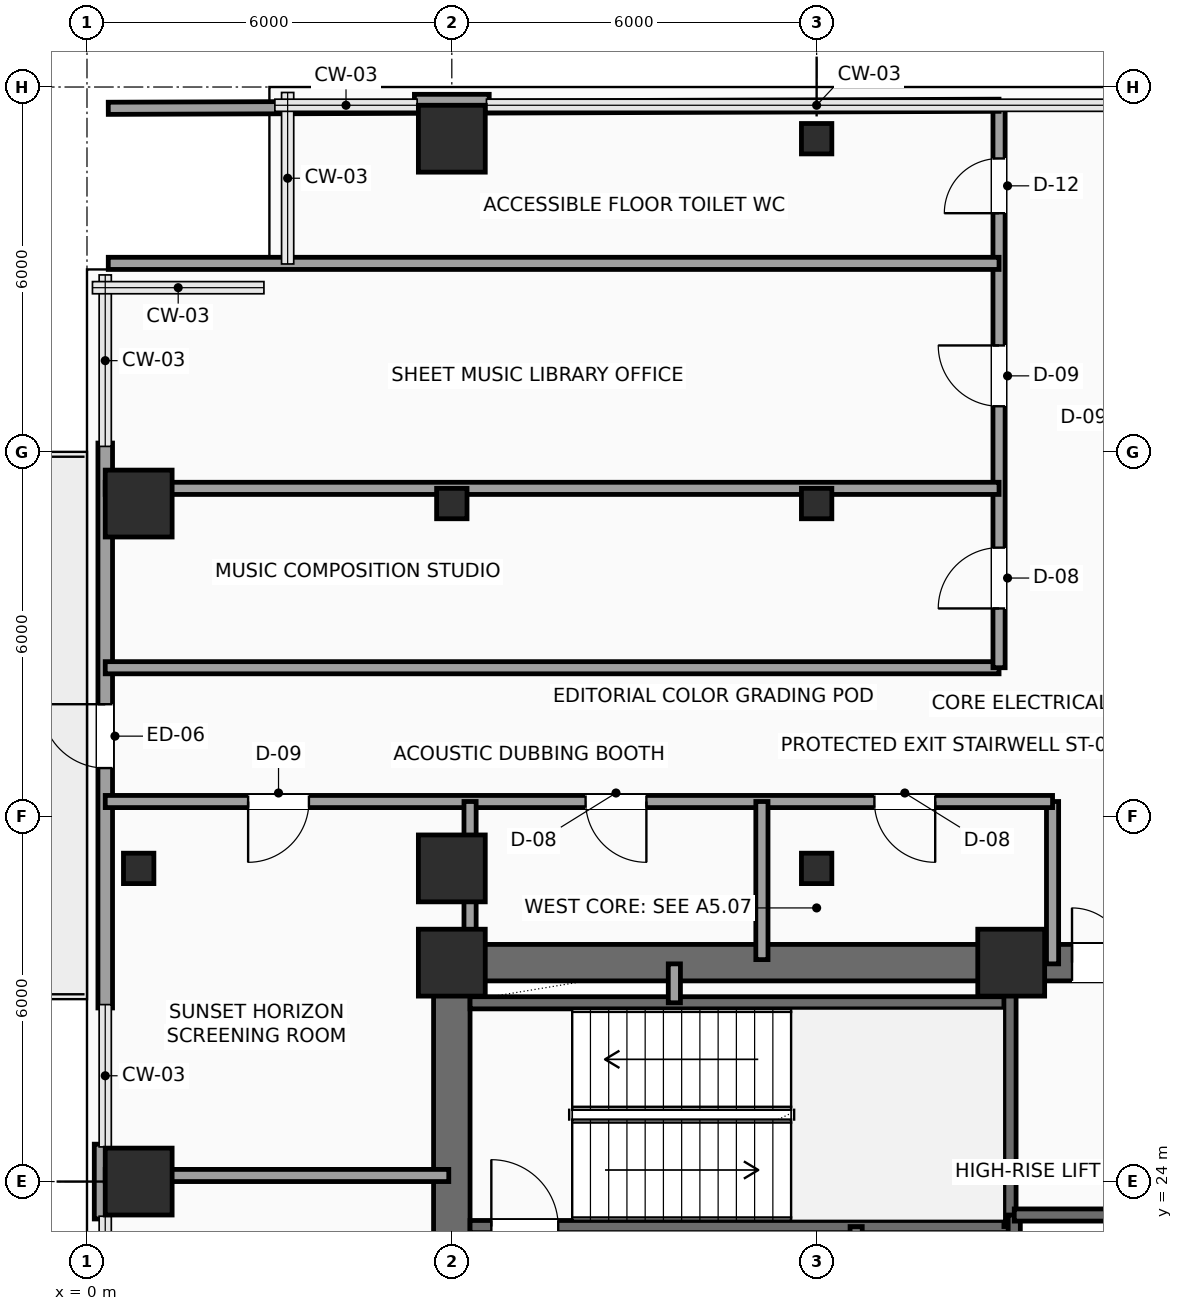
"""IFC4 building model, lengths in metres.
Left out: names, types, materials, properties, quantities, classifications, styles, units other than length and angle.
Written with IfcOpenShell. Run it as: python <this file> out.ifc"""

import sys

from ifc_helpers import new_model, si_unit, direction, frame, frame_2d, origin, origin_2d, place, context, subcontext, project, spatial, rectangle, hollow_rectangle, extrude, element, fill, save


model = new_model("IFC4")
c1 = context("Model", 3, precision=1e-05, world=origin(), true_north=direction((0.0, 1.0)))
c2 = subcontext(c1, "Body", "Model", "MODEL_VIEW")
j1 = project(units=[si_unit("LENGTHUNIT", "METRE"), si_unit("PLANEANGLEUNIT", "RADIAN")], contexts=[c1])
p1 = place(None, origin())
s1 = spatial("IfcSite", under=j1, at=p1, CompositionType="ELEMENT")
p2 = place(p1, origin())
s2 = spatial("IfcBuilding", under=s1, at=p2, CompositionType="ELEMENT")
p3 = place(p2, frame((0.0, 0.0, 123.15)))
s3 = spatial("IfcBuildingStorey", under=s2, at=p3, CompositionType="ELEMENT", Elevation=123.15)
for number, where, z_axis, x_axis in (
    (1, (6.0, 27.6, 0.0), (0.0, 0.0, 1.0), (1.0, 0.0, 0.0)),
    (2, (15.2, 27.6, 0.0), (0.0, 0.0, 1.0), (1.0, 0.0, 0.0)),
    (3, (0.85, 24.0, 0.0), (0.0, 0.0, 1.0), (1.0, 0.0, 0.0)),
):
    element("IfcColumn", number, at=place(p3, frame(where, z_axis=z_axis, x_axis=x_axis)), inside=s3, PredefinedType="COLUMN", context=c2, shape_type="SweptSolid", body=[
        extrude(rectangle(XDim=1.1, YDim=1.1, at=origin_2d()), origin(), (0.0, 0.0, 1.0), 3.75),
    ])
p4 = place(p3, frame((0.85, 29.15, 0.0), z_axis=(0.0, 0.0, 1.0), x_axis=(1.0, 0.0, 0.0)))
e4 = element("IfcColumn", 4, at=p4, inside=s3, PredefinedType="COLUMN", context=c2, shape_type="SweptSolid", body=[
    extrude(hollow_rectangle(XDim=0.5, YDim=0.5, WallThickness=0.025, InnerFilletRadius=0.025, OuterFilletRadius=0.04, at=origin_2d()), origin(), (0.0, 0.0, 1.0), 3.75),
])
for number, where, z_axis, x_axis in (
    (5, (0.85, 35.15, 0.0), (0.0, 0.0, 1.0), (1.0, 0.0, 0.0)),
    (6, (6.0, 29.15, 0.0), (0.0, 0.0, 1.0), (1.0, 0.0, 0.0)),
):
    element("IfcColumn", number, at=place(p3, frame(where, z_axis=z_axis, x_axis=x_axis)), inside=s3, PredefinedType="COLUMN", context=c2, shape_type="SweptSolid", body=[
        extrude(rectangle(XDim=1.1, YDim=1.1, at=origin_2d()), origin(), (0.0, 0.0, 1.0), 3.75),
    ])
p5 = place(p3, frame((6.0, 35.15, 0.0), z_axis=(0.0, 0.0, 1.0), x_axis=(1.0, 0.0, 0.0)))
e7 = element("IfcColumn", 7, at=p5, inside=s3, PredefinedType="COLUMN", context=c2, shape_type="SweptSolid", body=[
    extrude(hollow_rectangle(XDim=0.5, YDim=0.5, WallThickness=0.025, InnerFilletRadius=0.025, OuterFilletRadius=0.04, at=origin_2d()), origin(), (0.0, 0.0, 1.0), 3.75),
])
p6 = place(p3, frame((6.0, 41.15, 0.0), z_axis=(0.0, 0.0, 1.0), x_axis=(1.0, 0.0, 0.0)))
e8 = element("IfcColumn", 8, at=p6, inside=s3, PredefinedType="COLUMN", context=c2, shape_type="SweptSolid", body=[
    extrude(rectangle(XDim=1.1, YDim=1.1, at=origin_2d()), origin(), (0.0, 0.0, 1.0), 3.75),
])
for number, where, z_axis, x_axis in (
    (9, (12.0, 29.15, 0.0), (0.0, 0.0, 1.0), (1.0, 0.0, 0.0)),
    (10, (12.0, 35.15, 0.0), (0.0, 0.0, 1.0), (1.0, 0.0, 0.0)),
    (11, (12.0, 41.15, 0.0), (0.0, 0.0, 1.0), (1.0, 0.0, 0.0)),
):
    element("IfcColumn", number, at=place(p3, frame(where, z_axis=z_axis, x_axis=x_axis)), inside=s3, PredefinedType="COLUMN", context=c2, shape_type="SweptSolid", body=[
        extrude(hollow_rectangle(XDim=0.5, YDim=0.5, WallThickness=0.025, InnerFilletRadius=0.025, OuterFilletRadius=0.04, at=origin_2d()), origin(), (0.0, 0.0, 1.0), 3.75),
    ])
p7 = place(p3, frame((0.3, 26.855, 0.0), z_axis=(0.0, 0.0, 1.0), x_axis=(0.0, 1.0, 0.0)))
e12 = element("IfcWall", 12, at=p7, inside=s3, PredefinedType="SOLIDWALL", context=c2, shape_type="SweptSolid", body=[
    extrude(rectangle(XDim=9.29, YDim=0.24, at=frame_2d((4.645, 0.0))), origin(), (0.0, 0.0, 1.0), 3.525),
])
p8 = place(p7, frame((3.945, 0.0, 0.0)))
e13 = element("IfcOpeningElement", 13, at=p8, cuts=e12, PredefinedType="OPENING", context=c2, shape_type="SweptSolid", body=[
    extrude(rectangle(XDim=1.05, YDim=2.2, at=frame_2d((0.525, 1.1))), frame((0.0, 0.13, 0.0), z_axis=(0.0, -1.0, 0.0), x_axis=(1.0, 0.0, 0.0)), (0.0, 0.0, 1.0), 0.26),
])
for number, where, z_axis, x_axis in (
    (14, (0.24, 23.385, 0.0), (0.0, 0.0, 1.0), (0.0, 1.0, 0.0)),
    (15, (5.385, 41.76, 0.0), (0.0, 0.0, 1.0), (1.0, 0.0, 0.0)),
):
    element("IfcWall", number, at=place(p3, frame(where, z_axis=z_axis, x_axis=x_axis)), inside=s3, PredefinedType="SOLIDWALL", context=c2, shape_type="SweptSolid", body=[
        extrude(rectangle(XDim=1.23, YDim=0.24, at=frame_2d((0.615, 0.0))), origin(), (0.0, 0.0, 1.0), 3.525),
    ])
p9 = place(p3, frame((6.0, 27.6, 0.0), z_axis=(0.0, 0.0, 1.0), x_axis=(1.0, 0.0, 0.0)))
e16 = element("IfcWall", 16, at=p9, inside=s3, PredefinedType="SHEAR", context=c2, shape_type="SweptSolid", body=[
    extrude(rectangle(XDim=12.0, YDim=0.6, at=frame_2d((6.0, 0.0))), origin(), (0.0, 0.0, 1.0), 3.525),
])
p10 = place(p9, frame((10.2, 0.0, 0.0)))
e17 = element("IfcOpeningElement", 17, at=p10, cuts=e16, PredefinedType="OPENING", context=c2, shape_type="SweptSolid", body=[
    extrude(rectangle(XDim=0.9, YDim=2.15, at=frame_2d((0.45, 1.075))), frame((0.0, 0.31, 0.0), z_axis=(0.0, -1.0, 0.0), x_axis=(1.0, 0.0, 0.0)), (0.0, 0.0, 1.0), 0.62),
])
p11 = place(p3, frame((6.0, 18.0, 0.0), z_axis=(0.0, 0.0, 1.0), x_axis=(0.0, 1.0, 0.0)))
e18 = element("IfcWall", 18, at=p11, inside=s3, PredefinedType="SHEAR", context=c2, shape_type="SweptSolid", body=[
    extrude(rectangle(XDim=9.6, YDim=0.6, at=frame_2d((4.8, 0.0))), origin(), (0.0, 0.0, 1.0), 3.525),
])
p12 = place(p3, frame((6.3, 23.26, 0.0), z_axis=(0.0, 0.0, 1.0), x_axis=(1.0, 0.0, 0.0)))
e19 = element("IfcWall", 19, at=p12, inside=s3, PredefinedType="SHEAR", context=c2, shape_type="SweptSolid", body=[
    extrude(rectangle(XDim=8.88, YDim=0.2, at=frame_2d((4.44, 0.0))), origin(), (0.0, 0.0, 1.0), 3.525),
])
p13 = place(p12, frame((0.35, 0.0, 0.0)))
e20 = element("IfcOpeningElement", 20, at=p13, cuts=e19, PredefinedType="OPENING", context=c2, shape_type="SweptSolid", body=[
    extrude(rectangle(XDim=1.1, YDim=2.2, at=frame_2d((0.55, 1.1))), frame((0.0, 0.11, 0.0), z_axis=(0.0, -1.0, 0.0), x_axis=(1.0, 0.0, 0.0)), (0.0, 0.0, 1.0), 0.22),
])
p14 = place(p3, frame((6.3, 26.94, 0.0), z_axis=(0.0, 0.0, 1.0), x_axis=(1.0, 0.0, 0.0)))
e21 = element("IfcWall", 21, at=p14, inside=s3, PredefinedType="SHEAR", context=c2, shape_type="SweptSolid", body=[
    extrude(rectangle(XDim=8.88, YDim=0.2, at=frame_2d((4.44, 0.0))), origin(), (0.0, 0.0, 1.0), 3.525),
])
p15 = place(p3, frame((15.18, 23.26, 0.0), z_axis=(0.0, 0.0, 1.0), x_axis=(0.0, 1.0, 0.0)))
e22 = element("IfcWall", 22, at=p15, inside=s3, PredefinedType="SHEAR", context=c2, shape_type="SweptSolid", body=[
    extrude(rectangle(XDim=4.04, YDim=0.2, at=frame_2d((2.02, 0.0))), origin(), (0.0, 0.0, 1.0), 3.525),
])
p16 = place(p3, frame((12.65, 20.42, 0.0), z_axis=(0.0, 0.0, 1.0), x_axis=(0.0, 1.0, 0.0)))
e23 = element("IfcWall", 23, at=p16, inside=s3, PredefinedType="SHEAR", context=c2, shape_type="SweptSolid", body=[
    extrude(rectangle(XDim=2.84, YDim=0.2, at=frame_2d((1.42, 0.0))), origin(), (0.0, 0.0, 1.0), 3.525),
])
p17 = place(p16, frame((0.9, 0.0, 0.0)))
e24 = element("IfcOpeningElement", 24, at=p17, cuts=e23, PredefinedType="OPENING", context=c2, shape_type="SweptSolid", body=[
    extrude(rectangle(XDim=0.9, YDim=2.15, at=frame_2d((0.45, 1.075))), frame((0.0, 0.11, 0.0), z_axis=(0.0, -1.0, 0.0), x_axis=(1.0, 0.0, 0.0)), (0.0, 0.0, 1.0), 0.22),
])
p18 = place(p3, frame((9.66, 26.94, 0.0), z_axis=(0.0, 0.0, 1.0), x_axis=(0.0, 1.0, 0.0)))
e25 = element("IfcWall", 25, at=p18, inside=s3, PredefinedType="SOLIDWALL", context=c2, shape_type="SweptSolid", body=[
    extrude(rectangle(XDim=0.64, YDim=0.2, at=frame_2d((0.32, 0.0))), origin(), (0.0, 0.0, 1.0), 3.525),
])
p19 = place(p3, frame((15.25, 18.25, 0.0), z_axis=(0.0, 0.0, 1.0), x_axis=(0.0, 1.0, 0.0)))
e26 = element("IfcWall", 26, at=p19, inside=s3, PredefinedType="SHEAR", context=c2, shape_type="SweptSolid", body=[
    extrude(rectangle(XDim=5.2, YDim=0.2, at=frame_2d((2.6, 0.0))), origin(), (0.0, 0.0, 1.0), 3.525),
])
p20 = place(p3, frame((15.25, 23.45, 0.0), z_axis=(0.0, 0.0, 1.0), x_axis=(1.0, 0.0, 0.0)))
e27 = element("IfcWall", 27, at=p20, inside=s3, PredefinedType="SHEAR", context=c2, shape_type="SweptSolid", body=[
    extrude(rectangle(XDim=2.45, YDim=0.2, at=frame_2d((1.225, 0.0))), origin(), (0.0, 0.0, 1.0), 3.525),
])
p21 = place(p3, frame((15.88, 27.58, 0.0), z_axis=(0.0, 0.0, 1.0), x_axis=(0.0, 1.0, 0.0)))
e28 = element("IfcWall", 28, at=p21, inside=s3, PredefinedType="SOLIDWALL", context=c2, shape_type="SweptSolid", body=[
    extrude(rectangle(XDim=2.67, YDim=0.2, at=frame_2d((1.335, 0.0))), origin(), (0.0, 0.0, 1.0), 3.525),
])
p22 = place(p3, frame((15.88, 30.25, 0.0), z_axis=(0.0, 0.0, 1.0), x_axis=(-1.0, 0.0, 0.0)))
e29 = element("IfcWall", 29, at=p22, inside=s3, PredefinedType="SOLIDWALL", context=c2, shape_type="SweptSolid", body=[
    extrude(rectangle(XDim=15.58, YDim=0.2, at=frame_2d((7.79, 0.0))), origin(), (0.0, 0.0, 1.0), 3.525),
])
p23 = place(p22, frame((12.23, 0.0, 0.0)))
e30 = element("IfcOpeningElement", 30, at=p23, cuts=e29, PredefinedType="OPENING", context=c2, shape_type="SweptSolid", body=[
    extrude(rectangle(XDim=1.0, YDim=2.2, at=frame_2d((0.5, 1.1))), frame((0.0, 0.11, 0.0), z_axis=(0.0, -1.0, 0.0), x_axis=(1.0, 0.0, 0.0)), (0.0, 0.0, 1.0), 0.22),
])
p24 = place(p22, frame((6.68, 0.0, 0.0)))
e31 = element("IfcOpeningElement", 31, at=p24, cuts=e29, PredefinedType="OPENING", context=c2, shape_type="SweptSolid", body=[
    extrude(rectangle(XDim=1.0, YDim=2.2, at=frame_2d((0.5, 1.1))), frame((0.0, 0.11, 0.0), z_axis=(0.0, -1.0, 0.0), x_axis=(1.0, 0.0, 0.0)), (0.0, 0.0, 1.0), 0.22),
])
p25 = place(p22, frame((1.93, 0.0, 0.0)))
e32 = element("IfcOpeningElement", 32, at=p25, cuts=e29, PredefinedType="OPENING", context=c2, shape_type="SweptSolid", body=[
    extrude(rectangle(XDim=1.0, YDim=2.2, at=frame_2d((0.5, 1.1))), frame((0.0, 0.11, 0.0), z_axis=(0.0, -1.0, 0.0), x_axis=(1.0, 0.0, 0.0)), (0.0, 0.0, 1.0), 0.22),
])
p26 = place(p3, frame((0.3, 32.45, 0.0), z_axis=(0.0, 0.0, 1.0), x_axis=(1.0, 0.0, 0.0)))
e33 = element("IfcWall", 33, at=p26, inside=s3, PredefinedType="SOLIDWALL", context=c2, shape_type="SweptSolid", body=[
    extrude(rectangle(XDim=14.7, YDim=0.2, at=frame_2d((7.35, 0.0))), origin(), (0.0, 0.0, 1.0), 3.525),
])
p27 = place(p3, frame((15.0, 32.45, 0.0), z_axis=(0.0, 0.0, 1.0), x_axis=(0.0, 1.0, 0.0)))
e34 = element("IfcWall", 34, at=p27, inside=s3, PredefinedType="SOLIDWALL", context=c2, shape_type="SweptSolid", body=[
    extrude(rectangle(XDim=9.25, YDim=0.2, at=frame_2d((4.625, 0.0))), origin(), (0.0, 0.0, 1.0), 3.525),
])
p28 = place(p27, frame((0.975, 0.0, 0.0)))
e35 = element("IfcOpeningElement", 35, at=p28, cuts=e34, PredefinedType="OPENING", context=c2, shape_type="SweptSolid", body=[
    extrude(rectangle(XDim=1.0, YDim=2.2, at=frame_2d((0.5, 1.1))), frame((0.0, 0.11, 0.0), z_axis=(0.0, -1.0, 0.0), x_axis=(1.0, 0.0, 0.0)), (0.0, 0.0, 1.0), 0.22),
])
p29 = place(p27, frame((4.3, 0.0, 0.0)))
e36 = element("IfcOpeningElement", 36, at=p29, cuts=e34, PredefinedType="OPENING", context=c2, shape_type="SweptSolid", body=[
    extrude(rectangle(XDim=1.0, YDim=2.2, at=frame_2d((0.5, 1.1))), frame((0.0, 0.11, 0.0), z_axis=(0.0, -1.0, 0.0), x_axis=(1.0, 0.0, 0.0)), (0.0, 0.0, 1.0), 0.22),
])
p30 = place(p27, frame((7.475, 0.0, 0.0)))
e37 = element("IfcOpeningElement", 37, at=p30, cuts=e34, PredefinedType="OPENING", context=c2, shape_type="SweptSolid", body=[
    extrude(rectangle(XDim=0.9, YDim=2.1, at=frame_2d((0.45, 1.05))), frame((0.0, 0.11, 0.0), z_axis=(0.0, -1.0, 0.0), x_axis=(1.0, 0.0, 0.0)), (0.0, 0.0, 1.0), 0.22),
])
p31 = place(p3, frame((0.3, 24.1, 0.0), z_axis=(0.0, 0.0, 1.0), x_axis=(1.0, 0.0, 0.0)))
e38 = element("IfcWall", 38, at=p31, inside=s3, PredefinedType="PARTITIONING", context=c2, shape_type="SweptSolid", body=[
    extrude(rectangle(XDim=5.65, YDim=0.2, at=frame_2d((2.825, 0.0))), origin(), (0.0, 0.0, 1.0), 3.525),
])
p32 = place(p3, frame((6.3, 27.65, 0.0), z_axis=(0.0, 0.0, 1.0), x_axis=(0.0, 1.0, 0.0)))
e39 = element("IfcWall", 39, at=p32, inside=s3, PredefinedType="PARTITIONING", context=c2, shape_type="SweptSolid", body=[
    extrude(rectangle(XDim=2.6, YDim=0.2, at=frame_2d((1.3, 0.0))), origin(), (0.0, 0.0, 1.0), 3.017),
])
p33 = place(p3, frame((11.1, 27.65, 0.0), z_axis=(0.0, 0.0, 1.0), x_axis=(0.0, 1.0, 0.0)))
e40 = element("IfcWall", 40, at=p33, inside=s3, PredefinedType="PARTITIONING", context=c2, shape_type="SweptSolid", body=[
    extrude(rectangle(XDim=2.6, YDim=0.2, at=frame_2d((1.3, 0.0))), origin(), (0.0, 0.0, 1.0), 3.525),
])
p34 = place(p3, frame((0.3, 35.4, 0.0), z_axis=(0.0, 0.0, 1.0), x_axis=(1.0, 0.0, 0.0)))
e41 = element("IfcWall", 41, at=p34, inside=s3, PredefinedType="PARTITIONING", context=c2, shape_type="SweptSolid", body=[
    extrude(rectangle(XDim=14.7, YDim=0.2, at=frame_2d((7.35, 0.0))), origin(), (0.0, 0.0, 1.0), 3.017),
])
p35 = place(p3, frame((0.35, 39.1, 0.0), z_axis=(0.0, 0.0, 1.0), x_axis=(1.0, 0.0, 0.0)))
e42 = element("IfcWall", 42, at=p35, inside=s3, PredefinedType="PARTITIONING", context=c2, shape_type="SweptSolid", body=[
    extrude(rectangle(XDim=14.65, YDim=0.2, at=frame_2d((7.325, 0.0))), origin(), (0.0, 0.0, 1.0), 3.525),
])
p36 = place(p3, frame((0.35, 41.65, 0.0), z_axis=(0.0, 0.0, 1.0), x_axis=(0.999994073761, 0.003442737683, 0.0)))
e43 = element("IfcWall", 43, at=p36, inside=s3, PredefinedType="PARTITIONING", context=c2, shape_type="SweptSolid", body=[
    extrude(rectangle(XDim=5.035, YDim=0.2, at=frame_2d((2.518, 0.0))), origin(), (0.0, 0.0, 1.0), 3.525),
])
p37 = place(p3, frame((6.615, 41.671, 0.0), z_axis=(0.0, 0.0, 1.0), x_axis=(0.999994197557, 0.003406589638, 0.0)))
e44 = element("IfcWall", 44, at=p37, inside=s3, PredefinedType="PARTITIONING", context=c2, shape_type="SweptSolid", body=[
    extrude(rectangle(XDim=8.385, YDim=0.2, at=frame_2d((4.192, 0.0))), origin(), (0.0, 0.0, 1.0), 3.525),
])
p38 = place(p8, origin())
e45 = element("IfcDoor", 45, at=p38, inside=s3, OperationType="SINGLE_SWING_RIGHT", PredefinedType="DOOR", context=c2, shape_type="SweptSolid", body=[
    extrude(rectangle(XDim=1.05, YDim=2.2, at=frame_2d((0.525, 1.1))), frame((0.0, 0.025, 0.0), z_axis=(0.0, -1.0, 0.0), x_axis=(1.0, 0.0, 0.0)), (0.0, 0.0, 1.0), 0.05),
])
fill(e13, e45)
p39 = place(p10, origin())
e46 = element("IfcDoor", 46, at=p39, inside=s3, OperationType="SINGLE_SWING_LEFT", PredefinedType="DOOR", context=c2, shape_type="SweptSolid", body=[
    extrude(rectangle(XDim=0.9, YDim=2.15, at=frame_2d((0.45, 1.075))), frame((0.0, 0.025, 0.0), z_axis=(0.0, -1.0, 0.0), x_axis=(1.0, 0.0, 0.0)), (0.0, 0.0, 1.0), 0.05),
])
fill(e17, e46)
p40 = place(p13, origin())
e47 = element("IfcDoor", 47, at=p40, inside=s3, OperationType="SINGLE_SWING_LEFT", PredefinedType="DOOR", context=c2, shape_type="SweptSolid", body=[
    extrude(rectangle(XDim=1.1, YDim=2.2, at=frame_2d((0.55, 1.1))), frame((0.0, 0.025, 0.0), z_axis=(0.0, -1.0, 0.0), x_axis=(1.0, 0.0, 0.0)), (0.0, 0.0, 1.0), 0.05),
])
fill(e20, e47)
p41 = place(p23, origin())
e48 = element("IfcDoor", 48, at=p41, inside=s3, OperationType="SINGLE_SWING_RIGHT", PredefinedType="DOOR", context=c2, shape_type="SweptSolid", body=[
    extrude(rectangle(XDim=1.0, YDim=2.2, at=frame_2d((0.5, 1.1))), frame((0.0, 0.025, 0.0), z_axis=(0.0, -1.0, 0.0), x_axis=(1.0, 0.0, 0.0)), (0.0, 0.0, 1.0), 0.05),
])
fill(e30, e48)
p42 = place(p24, origin())
e49 = element("IfcDoor", 49, at=p42, inside=s3, OperationType="SINGLE_SWING_LEFT", PredefinedType="DOOR", context=c2, shape_type="SweptSolid", body=[
    extrude(rectangle(XDim=1.0, YDim=2.2, at=frame_2d((0.5, 1.1))), frame((0.0, 0.025, 0.0), z_axis=(0.0, -1.0, 0.0), x_axis=(1.0, 0.0, 0.0)), (0.0, 0.0, 1.0), 0.05),
])
fill(e31, e49)
p43 = place(p25, origin())
e50 = element("IfcDoor", 50, at=p43, inside=s3, OperationType="SINGLE_SWING_LEFT", PredefinedType="DOOR", context=c2, shape_type="SweptSolid", body=[
    extrude(rectangle(XDim=1.0, YDim=2.2, at=frame_2d((0.5, 1.1))), frame((0.0, 0.025, 0.0), z_axis=(0.0, -1.0, 0.0), x_axis=(1.0, 0.0, 0.0)), (0.0, 0.0, 1.0), 0.05),
])
fill(e32, e50)
p44 = place(p28, origin())
e51 = element("IfcDoor", 51, at=p44, inside=s3, OperationType="SINGLE_SWING_LEFT", PredefinedType="DOOR", context=c2, shape_type="SweptSolid", body=[
    extrude(rectangle(XDim=1.0, YDim=2.2, at=frame_2d((0.5, 1.1))), frame((0.0, 0.025, 0.0), z_axis=(0.0, -1.0, 0.0), x_axis=(1.0, 0.0, 0.0)), (0.0, 0.0, 1.0), 0.05),
])
fill(e35, e51)
p45 = place(p29, origin())
e52 = element("IfcDoor", 52, at=p45, inside=s3, OperationType="SINGLE_SWING_RIGHT", PredefinedType="DOOR", context=c2, shape_type="SweptSolid", body=[
    extrude(rectangle(XDim=1.0, YDim=2.2, at=frame_2d((0.5, 1.1))), frame((0.0, 0.025, 0.0), z_axis=(0.0, -1.0, 0.0), x_axis=(1.0, 0.0, 0.0)), (0.0, 0.0, 1.0), 0.05),
])
fill(e36, e52)
p46 = place(p30, origin())
e53 = element("IfcDoor", 53, at=p46, inside=s3, OperationType="SINGLE_SWING_LEFT", PredefinedType="DOOR", context=c2, shape_type="SweptSolid", body=[
    extrude(rectangle(XDim=0.9, YDim=2.1, at=frame_2d((0.45, 1.05))), frame((0.0, 0.025, 0.0), z_axis=(0.0, -1.0, 0.0), x_axis=(1.0, 0.0, 0.0)), (0.0, 0.0, 1.0), 0.05),
])
fill(e37, e53)
save(model, sys.argv[1])
